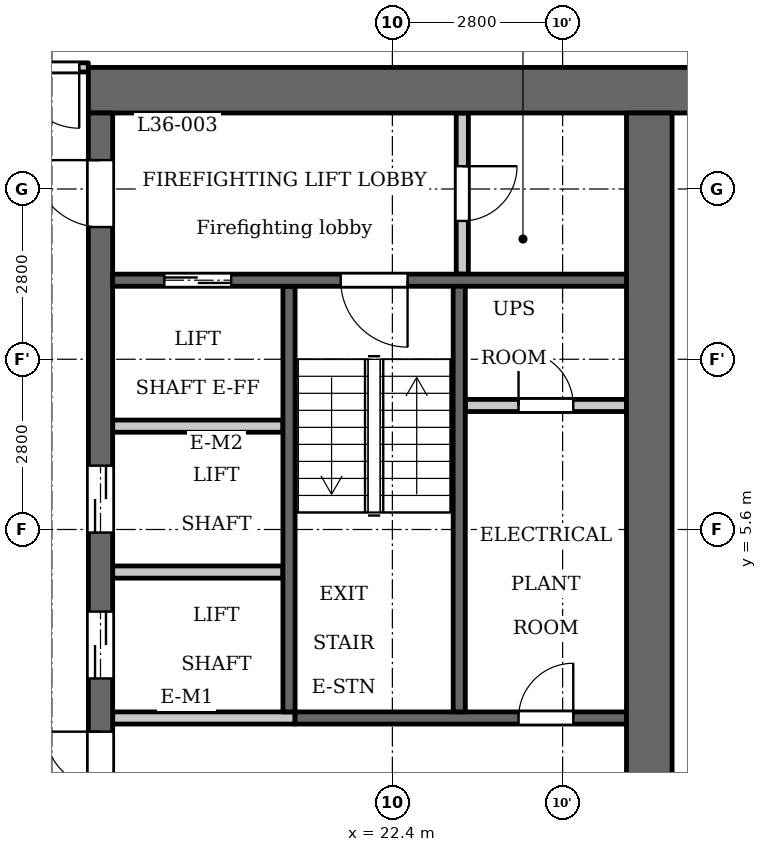
"""IFC4 building model, lengths in metres.
Left out: names, types, materials, properties, quantities, classifications, styles, units other than length and angle.
Written with IfcOpenShell. Run it as: python <this file> out.ifc"""

import sys

from ifc_helpers import new_model, si_unit, direction, frame, frame_2d, origin, place, context, subcontext, project, spatial, rectangle, extrude, element, fill, save


model = new_model("IFC4")
c1 = context("Model", 3, precision=1e-05, world=origin(), true_north=direction((0.0, 1.0)))
c2 = subcontext(c1, "Body", "Model", "MODEL_VIEW")
j1 = project(units=[si_unit("LENGTHUNIT", "METRE"), si_unit("PLANEANGLEUNIT", "RADIAN")], contexts=[c1])
p1 = place(None, origin())
s1 = spatial("IfcSite", under=j1, at=p1, CompositionType="ELEMENT")
p2 = place(p1, origin())
s2 = spatial("IfcBuilding", under=s1, at=p2, CompositionType="ELEMENT")
p3 = place(p2, frame((0.0, 0.0, 143.1)))
s3 = spatial("IfcBuildingStorey", under=s2, at=p3, CompositionType="ELEMENT", Elevation=143.1)
p4 = place(p3, frame((20.7, 2.6, 0.0), z_axis=(0.0, 0.0, 1.0), x_axis=(0.0, 1.0, 0.0)))
e1 = element("IfcWall", 1, at=p4, inside=s3, PredefinedType="SHEAR", context=c2, shape_type="SweptSolid", body=[
    extrude(rectangle(XDim=7.0, YDim=0.2, at=frame_2d((3.5, 0.0))), origin(), (0.0, 0.0, 1.0), 3.2),
])
p5 = place(p3, frame((20.8, 2.5, 0.0), z_axis=(0.0, 0.0, 1.0), x_axis=(1.0, 0.0, 0.0)))
e2 = element("IfcWall", 2, at=p5, inside=s3, PredefinedType="SHEAR", context=c2, shape_type="SweptSolid", body=[
    extrude(rectangle(XDim=5.45, YDim=0.2, at=frame_2d((2.725, 0.0))), origin(), (0.0, 0.0, 1.0), 3.2),
])
p6 = place(p5, frame((3.675, 0.0, 0.0)))
e3 = element("IfcOpeningElement", 3, at=p6, cuts=e2, PredefinedType="OPENING", context=c2, shape_type="SweptSolid", body=[
    extrude(rectangle(XDim=0.9, YDim=2.1, at=frame_2d((0.45, 1.05))), frame((0.0, 0.11, 0.0), z_axis=(0.0, -1.0, 0.0), x_axis=(1.0, 0.0, 0.0)), (0.0, 0.0, 1.0), 0.22),
])
p7 = place(p3, frame((17.4, 12.825, 0.0), z_axis=(0.0, 0.0, 1.0), x_axis=(1.0, 0.0, 0.0)))
e4 = element("IfcWall", 4, at=p7, inside=s3, PredefinedType="SHEAR", context=c2, shape_type="SweptSolid", body=[
    extrude(rectangle(XDim=10.4, YDim=0.75, at=frame_2d((5.2, 0.0))), origin(), (0.0, 0.0, 1.0), 3.2),
])
p8 = place(p3, frame((17.6, -12.45, 0.0), z_axis=(0.0, 0.0, 1.0), x_axis=(0.0, 1.0, 0.0)))
e5 = element("IfcWall", 5, at=p8, inside=s3, PredefinedType="SHEAR", context=c2, shape_type="SweptSolid", body=[
    extrude(rectangle(XDim=24.9, YDim=0.4, at=frame_2d((12.45, 0.0))), origin(), (0.0, 0.0, 1.0), 3.2),
])
p9 = place(p8, frame((8.65, 0.0, 0.0)))
e6 = element("IfcOpeningElement", 6, at=p9, cuts=e5, PredefinedType="OPENING", context=c2, shape_type="SweptSolid", body=[
    extrude(rectangle(XDim=0.9, YDim=2.1, at=frame_2d((0.45, 1.05))), frame((0.0, 0.21, 0.0), z_axis=(0.0, -1.0, 0.0), x_axis=(1.0, 0.0, 0.0)), (0.0, 0.0, 1.0), 0.42),
])
p10 = place(p8, frame((15.6, 0.0, 0.0)))
e7 = element("IfcOpeningElement", 7, at=p10, cuts=e5, PredefinedType="OPENING", context=c2, shape_type="SweptSolid", body=[
    extrude(rectangle(XDim=1.1, YDim=2.1, at=frame_2d((0.55, 1.05))), frame((0.0, 0.21, 0.0), z_axis=(0.0, -1.0, 0.0), x_axis=(1.0, 0.0, 0.0)), (0.0, 0.0, 1.0), 0.42),
])
p11 = place(p8, frame((18.0, 0.0, 0.0)))
e8 = element("IfcOpeningElement", 8, at=p11, cuts=e5, PredefinedType="OPENING", context=c2, shape_type="SweptSolid", body=[
    extrude(rectangle(XDim=1.1, YDim=2.1, at=frame_2d((0.55, 1.05))), frame((0.0, 0.21, 0.0), z_axis=(0.0, -1.0, 0.0), x_axis=(1.0, 0.0, 0.0)), (0.0, 0.0, 1.0), 0.42),
])
p12 = place(p8, frame((23.025, 0.0, 0.0)))
e9 = element("IfcOpeningElement", 9, at=p12, cuts=e5, PredefinedType="OPENING", context=c2, shape_type="SweptSolid", body=[
    extrude(rectangle(XDim=1.1, YDim=2.1, at=frame_2d((0.55, 1.05))), frame((0.0, 0.21, 0.0), z_axis=(0.0, -1.0, 0.0), x_axis=(1.0, 0.0, 0.0)), (0.0, 0.0, 1.0), 0.42),
])
p13 = place(p8, frame((0.775, 0.0, 0.0)))
e10 = element("IfcOpeningElement", 10, at=p13, cuts=e5, PredefinedType="OPENING", context=c2, shape_type="SweptSolid", body=[
    extrude(rectangle(XDim=1.1, YDim=2.1, at=frame_2d((0.55, 1.05))), frame((0.0, 0.21, 0.0), z_axis=(0.0, -1.0, 0.0), x_axis=(1.0, 0.0, 0.0)), (0.0, 0.0, 1.0), 0.42),
])
p14 = place(p8, frame((12.925, 0.0, 0.0)))
e11 = element("IfcOpeningElement", 11, at=p14, cuts=e5, PredefinedType="OPENING", context=c2, shape_type="SweptSolid", body=[
    extrude(rectangle(XDim=1.8, YDim=2.1, at=frame_2d((0.9, 1.05))), frame((0.0, 0.21, 0.0), z_axis=(0.0, -1.0, 0.0), x_axis=(1.0, 0.0, 0.0)), (0.0, 0.0, 1.0), 0.42),
])
p15 = place(p3, frame((26.625, -12.45, 0.0), z_axis=(0.0, 0.0, 1.0), x_axis=(0.0, 1.0, 0.0)))
e12 = element("IfcWall", 12, at=p15, inside=s3, PredefinedType="SHEAR", context=c2, shape_type="SweptSolid", body=[
    extrude(rectangle(XDim=24.9, YDim=0.75, at=frame_2d((12.45, 0.0))), origin(), (0.0, 0.0, 1.0), 3.2),
])
p16 = place(p3, frame((23.55, 9.8, 0.0), z_axis=(0.0, 0.0, 1.0), x_axis=(0.0, 1.0, 0.0)))
e13 = element("IfcWall", 13, at=p16, inside=s3, PredefinedType="PARTITIONING", context=c2, shape_type="SweptSolid", body=[
    extrude(rectangle(XDim=2.65, YDim=0.2, at=frame_2d((1.325, 0.0))), origin(), (0.0, 0.0, 1.0), 3.2),
])
p17 = place(p16, frame((0.875, 0.0, 0.0)))
e14 = element("IfcOpeningElement", 14, at=p17, cuts=e13, PredefinedType="OPENING", context=c2, shape_type="SweptSolid", body=[
    extrude(rectangle(XDim=0.9, YDim=2.1, at=frame_2d((0.45, 1.05))), frame((0.0, 0.11, 0.0), z_axis=(0.0, -1.0, 0.0), x_axis=(1.0, 0.0, 0.0)), (0.0, 0.0, 1.0), 0.22),
])
p18 = place(p3, frame((23.6, 7.64, 0.0), z_axis=(0.0, 0.0, 1.0), x_axis=(1.0, 0.0, 0.0)))
e15 = element("IfcWall", 15, at=p18, inside=s3, PredefinedType="PARTITIONING", context=c2, shape_type="SweptSolid", body=[
    extrude(rectangle(XDim=2.65, YDim=0.2, at=frame_2d((1.325, 0.0))), origin(), (0.0, 0.0, 1.0), 3.2),
])
p19 = place(p18, frame((0.875, 0.0, 0.0)))
e16 = element("IfcOpeningElement", 16, at=p19, cuts=e15, PredefinedType="OPENING", context=c2, shape_type="SweptSolid", body=[
    extrude(rectangle(XDim=0.9, YDim=2.1, at=frame_2d((0.45, 1.05))), frame((0.0, 0.11, 0.0), z_axis=(0.0, -1.0, 0.0), x_axis=(1.0, 0.0, 0.0)), (0.0, 0.0, 1.0), 0.22),
])
p20 = place(p3, frame((17.8, 2.5, 0.0), z_axis=(0.0, 0.0, 1.0), x_axis=(1.0, 0.0, 0.0)))
e17 = element("IfcWall", 17, at=p20, inside=s3, PredefinedType="PARTITIONING", context=c2, shape_type="SweptSolid", body=[
    extrude(rectangle(XDim=3.0, YDim=0.2, at=frame_2d((1.5, 0.0))), origin(), (0.0, 0.0, 1.0), 3.2),
])
for number, where, z_axis, x_axis in (
    (18, (17.8, 4.9, 0.0), (0.0, 0.0, 1.0), (1.0, 0.0, 0.0)),
    (19, (17.8, 7.3, 0.0), (0.0, 0.0, 1.0), (1.0, 0.0, 0.0)),
):
    element("IfcWall", number, at=place(p3, frame(where, z_axis=z_axis, x_axis=x_axis)), inside=s3, PredefinedType="PARTITIONING", context=c2, shape_type="SweptSolid", body=[
        extrude(rectangle(XDim=2.8, YDim=0.2, at=frame_2d((1.4, 0.0))), origin(), (0.0, 0.0, 1.0), 3.2),
    ])
p21 = place(p3, frame((17.8, 9.7, 0.0), z_axis=(0.0, 0.0, 1.0), x_axis=(1.0, 0.0, 0.0)))
e20 = element("IfcWall", 20, at=p21, inside=s3, PredefinedType="SHEAR", context=c2, shape_type="SweptSolid", body=[
    extrude(rectangle(XDim=8.45, YDim=0.2, at=frame_2d((4.225, 0.0))), origin(), (0.0, 0.0, 1.0), 3.2),
])
p22 = place(p21, frame((0.85, 0.0, 0.0)))
e21 = element("IfcOpeningElement", 21, at=p22, cuts=e20, PredefinedType="OPENING", context=c2, shape_type="SweptSolid", body=[
    extrude(rectangle(XDim=1.1, YDim=2.1, at=frame_2d((0.55, 1.05))), frame((0.0, 0.11, 0.0), z_axis=(0.0, -1.0, 0.0), x_axis=(1.0, 0.0, 0.0)), (0.0, 0.0, 1.0), 0.22),
])
p23 = place(p21, frame((3.75, 0.0, 0.0)))
e22 = element("IfcOpeningElement", 22, at=p23, cuts=e20, PredefinedType="OPENING", context=c2, shape_type="SweptSolid", body=[
    extrude(rectangle(XDim=1.1, YDim=2.1, at=frame_2d((0.55, 1.05))), frame((0.0, 0.11, 0.0), z_axis=(0.0, -1.0, 0.0), x_axis=(1.0, 0.0, 0.0)), (0.0, 0.0, 1.0), 0.22),
])
p24 = place(p3, frame((23.5, 2.6, 0.0), z_axis=(0.0, 0.0, 1.0), x_axis=(0.0, 1.0, 0.0)))
e23 = element("IfcWall", 23, at=p24, inside=s3, PredefinedType="SHEAR", context=c2, shape_type="SweptSolid", body=[
    extrude(rectangle(XDim=7.0, YDim=0.2, at=frame_2d((3.5, 0.0))), origin(), (0.0, 0.0, 1.0), 3.2),
])
p25 = place(p3, frame((-17.4, 13.2, 0.0), z_axis=(0.0, 0.0, 1.0), x_axis=(1.0, 0.0, 0.0)))
e24 = element("IfcWall", 24, at=p25, inside=s3, PredefinedType="PARTITIONING", context=c2, shape_type="SweptSolid", body=[
    extrude(rectangle(XDim=34.8, YDim=0.15, at=frame_2d((17.4, 0.0))), origin(), (0.0, 0.0, 1.0), 3.2),
])
p26 = place(p25, frame((0.25, 0.0, 0.0)))
e25 = element("IfcOpeningElement", 25, at=p26, cuts=e24, PredefinedType="OPENING", context=c2, shape_type="SweptSolid", body=[
    extrude(rectangle(XDim=1.0, YDim=2.1, at=frame_2d((0.5, 1.05))), frame((0.0, 0.085, 0.0), z_axis=(0.0, -1.0, 0.0), x_axis=(1.0, 0.0, 0.0)), (0.0, 0.0, 1.0), 0.17),
])
p27 = place(p25, frame((33.65, 0.0, 0.0)))
e26 = element("IfcOpeningElement", 26, at=p27, cuts=e24, PredefinedType="OPENING", context=c2, shape_type="SweptSolid", body=[
    extrude(rectangle(XDim=1.0, YDim=2.1, at=frame_2d((0.5, 1.05))), frame((0.0, 0.085, 0.0), z_axis=(0.0, -1.0, 0.0), x_axis=(1.0, 0.0, 0.0)), (0.0, 0.0, 1.0), 0.17),
])
p28 = place(p25, frame((15.75, 0.0, 0.0)))
e27 = element("IfcOpeningElement", 27, at=p28, cuts=e24, PredefinedType="OPENING", context=c2, shape_type="SweptSolid", body=[
    extrude(rectangle(XDim=1.0, YDim=2.1, at=frame_2d((0.5, 1.05))), frame((0.0, 0.085, 0.0), z_axis=(0.0, -1.0, 0.0), x_axis=(1.0, 0.0, 0.0)), (0.0, 0.0, 1.0), 0.17),
])
p29 = place(p25, frame((19.35, 0.0, 0.0)))
e28 = element("IfcOpeningElement", 28, at=p29, cuts=e24, PredefinedType="OPENING", context=c2, shape_type="SweptSolid", body=[
    extrude(rectangle(XDim=1.0, YDim=2.1, at=frame_2d((0.5, 1.05))), frame((0.0, 0.085, 0.0), z_axis=(0.0, -1.0, 0.0), x_axis=(1.0, 0.0, 0.0)), (0.0, 0.0, 1.0), 0.17),
])
p30 = place(p25, frame((26.95, 0.0, 0.0)))
e29 = element("IfcOpeningElement", 29, at=p30, cuts=e24, PredefinedType="OPENING", context=c2, shape_type="SweptSolid", body=[
    extrude(rectangle(XDim=1.0, YDim=2.1, at=frame_2d((0.5, 1.05))), frame((0.0, 0.085, 0.0), z_axis=(0.0, -1.0, 0.0), x_axis=(1.0, 0.0, 0.0)), (0.0, 0.0, 1.0), 0.17),
])
p31 = place(p25, frame((29.75, 0.0, 0.0)))
e30 = element("IfcOpeningElement", 30, at=p31, cuts=e24, PredefinedType="OPENING", context=c2, shape_type="SweptSolid", body=[
    extrude(rectangle(XDim=1.0, YDim=2.1, at=frame_2d((0.5, 1.05))), frame((0.0, 0.085, 0.0), z_axis=(0.0, -1.0, 0.0), x_axis=(1.0, 0.0, 0.0)), (0.0, 0.0, 1.0), 0.17),
])
p32 = place(p10, origin())
e31 = element("IfcDoor", 31, at=p32, inside=s3, OperationType="DOUBLE_DOOR_SLIDING", PredefinedType="DOOR", context=c2, shape_type="SweptSolid", body=[
    extrude(rectangle(XDim=1.1, YDim=2.1, at=frame_2d((0.55, 1.05))), frame((0.0, 0.025, 0.0), z_axis=(0.0, -1.0, 0.0), x_axis=(1.0, 0.0, 0.0)), (0.0, 0.0, 1.0), 0.05),
])
fill(e7, e31)
p33 = place(p11, origin())
e32 = element("IfcDoor", 32, at=p33, inside=s3, OperationType="DOUBLE_DOOR_SLIDING", PredefinedType="DOOR", context=c2, shape_type="SweptSolid", body=[
    extrude(rectangle(XDim=1.1, YDim=2.1, at=frame_2d((0.55, 1.05))), frame((0.0, 0.025, 0.0), z_axis=(0.0, -1.0, 0.0), x_axis=(1.0, 0.0, 0.0)), (0.0, 0.0, 1.0), 0.05),
])
fill(e8, e32)
p34 = place(p22, origin())
e33 = element("IfcDoor", 33, at=p34, inside=s3, OperationType="DOUBLE_DOOR_SLIDING", PredefinedType="DOOR", context=c2, shape_type="SweptSolid", body=[
    extrude(rectangle(XDim=1.1, YDim=2.1, at=frame_2d((0.55, 1.05))), frame((0.0, 0.025, 0.0), z_axis=(0.0, -1.0, 0.0), x_axis=(1.0, 0.0, 0.0)), (0.0, 0.0, 1.0), 0.05),
])
fill(e21, e33)
p35 = place(p12, origin())
e34 = element("IfcDoor", 34, at=p35, inside=s3, OperationType="SINGLE_SWING_LEFT", PredefinedType="DOOR", context=c2, shape_type="SweptSolid", body=[
    extrude(rectangle(XDim=1.1, YDim=2.1, at=frame_2d((0.55, 1.05))), frame((0.0, 0.025, 0.0), z_axis=(0.0, -1.0, 0.0), x_axis=(1.0, 0.0, 0.0)), (0.0, 0.0, 1.0), 0.05),
])
fill(e9, e34)
p36 = place(p17, origin())
e35 = element("IfcDoor", 35, at=p36, inside=s3, OperationType="SINGLE_SWING_RIGHT", PredefinedType="DOOR", context=c2, shape_type="SweptSolid", body=[
    extrude(rectangle(XDim=0.9, YDim=2.1, at=frame_2d((0.45, 1.05))), frame((0.0, 0.025, 0.0), z_axis=(0.0, -1.0, 0.0), x_axis=(1.0, 0.0, 0.0)), (0.0, 0.0, 1.0), 0.05),
])
fill(e14, e35)
p37 = place(p23, origin())
e36 = element("IfcDoor", 36, at=p37, inside=s3, OperationType="SINGLE_SWING_RIGHT", PredefinedType="DOOR", context=c2, shape_type="SweptSolid", body=[
    extrude(rectangle(XDim=1.1, YDim=2.1, at=frame_2d((0.55, 1.05))), frame((0.0, 0.025, 0.0), z_axis=(0.0, -1.0, 0.0), x_axis=(1.0, 0.0, 0.0)), (0.0, 0.0, 1.0), 0.05),
])
fill(e22, e36)
p38 = place(p14, origin())
e37 = element("IfcDoor", 37, at=p38, inside=s3, OperationType="DOUBLE_DOOR_SINGLE_SWING", PredefinedType="DOOR", context=c2, shape_type="SweptSolid", body=[
    extrude(rectangle(XDim=1.8, YDim=2.1, at=frame_2d((0.9, 1.05))), frame((0.0, 0.025, 0.0), z_axis=(0.0, -1.0, 0.0), x_axis=(1.0, 0.0, 0.0)), (0.0, 0.0, 1.0), 0.05),
])
fill(e11, e37)
p39 = place(p19, origin())
e38 = element("IfcDoor", 38, at=p39, inside=s3, OperationType="SINGLE_SWING_RIGHT", PredefinedType="DOOR", context=c2, shape_type="SweptSolid", body=[
    extrude(rectangle(XDim=0.9, YDim=2.1, at=frame_2d((0.45, 1.05))), frame((0.0, 0.025, 0.0), z_axis=(0.0, -1.0, 0.0), x_axis=(1.0, 0.0, 0.0)), (0.0, 0.0, 1.0), 0.05),
])
fill(e16, e38)
p40 = place(p6, origin())
e39 = element("IfcDoor", 39, at=p40, inside=s3, OperationType="SINGLE_SWING_LEFT", PredefinedType="DOOR", context=c2, shape_type="SweptSolid", body=[
    extrude(rectangle(XDim=0.9, YDim=2.1, at=frame_2d((0.45, 1.05))), frame((0.0, 0.025, 0.0), z_axis=(0.0, -1.0, 0.0), x_axis=(1.0, 0.0, 0.0)), (0.0, 0.0, 1.0), 0.05),
])
fill(e3, e39)
p41 = place(p27, origin())
e40 = element("IfcDoor", 40, at=p41, inside=s3, OperationType="SINGLE_SWING_RIGHT", PredefinedType="DOOR", context=c2, shape_type="SweptSolid", body=[
    extrude(rectangle(XDim=1.0, YDim=2.1, at=frame_2d((0.5, 1.05))), frame((0.0, 0.025, 0.0), z_axis=(0.0, -1.0, 0.0), x_axis=(1.0, 0.0, 0.0)), (0.0, 0.0, 1.0), 0.05),
])
fill(e26, e40)
save(model, sys.argv[1])
